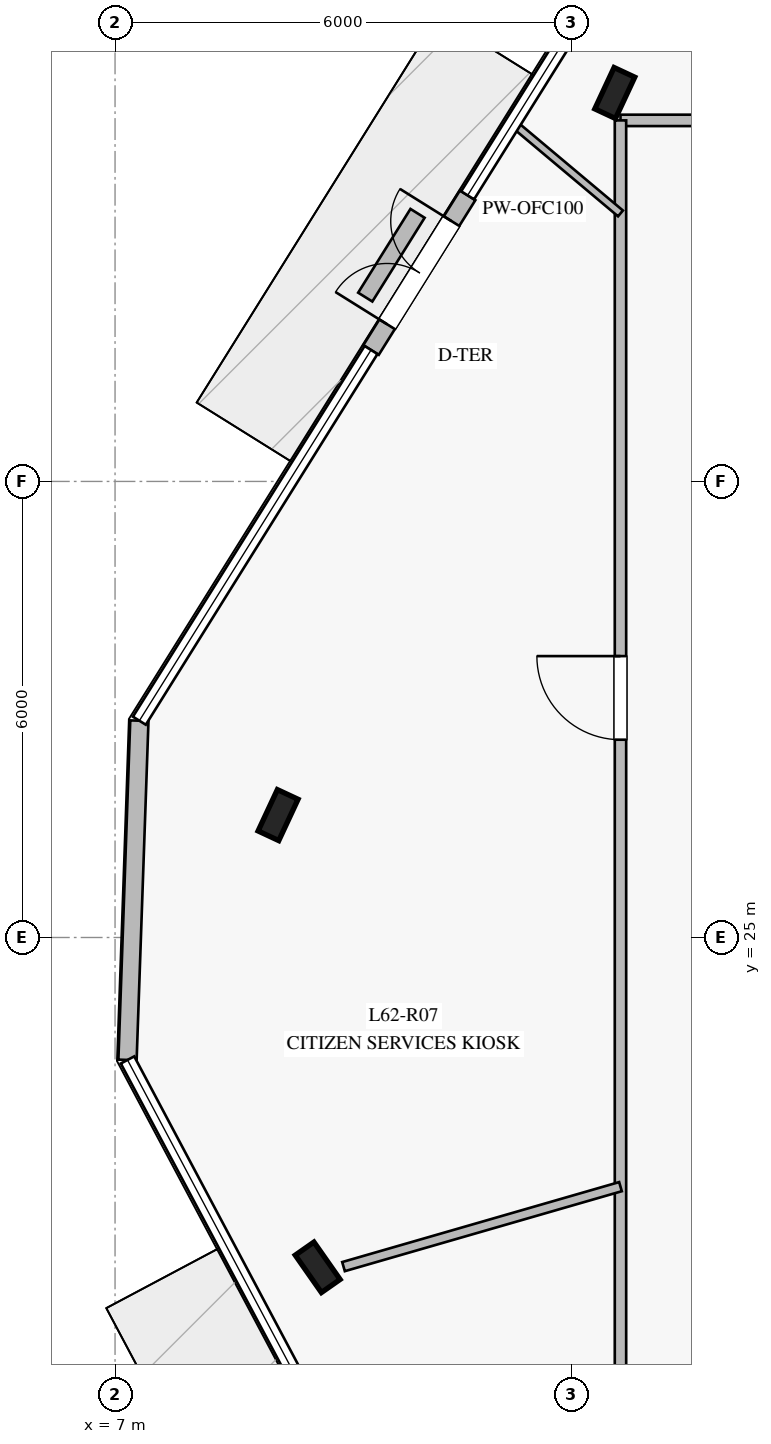
"""IFC4 building model, lengths in metres.
Left out: names, types, materials, properties, quantities, classifications, styles, units other than length and angle.
Written with IfcOpenShell. Run it as: python <this file> out.ifc"""

import sys

from ifc_helpers import new_model, si_unit, direction, frame, frame_2d, origin, origin_2d, place, context, subcontext, project, spatial, rectangle, i_section, extrude, element, fill, save


model = new_model("IFC4")
c1 = context("Model", 3, precision=1e-05, world=origin(), true_north=direction((0.0, 1.0)))
c2 = subcontext(c1, "Body", "Model", "MODEL_VIEW")
j1 = project(units=[si_unit("LENGTHUNIT", "METRE"), si_unit("PLANEANGLEUNIT", "RADIAN")], contexts=[c1])
p1 = place(None, origin())
s1 = spatial("IfcSite", under=j1, at=p1, CompositionType="ELEMENT")
p2 = place(p1, origin())
s2 = spatial("IfcBuilding", under=s1, at=p2, CompositionType="ELEMENT")
p3 = place(p2, frame((0.0, 0.0, 258.2)))
s3 = spatial("IfcBuildingStorey", under=s2, at=p3, CompositionType="ELEMENT", Elevation=258.2)
for number, where, z_axis, x_axis in (
    (1, (13.575, 36.11, 0.0), (0.0, 0.0, 1.0), (0.423, 0.906, 0.0)),
    (2, (9.145, 26.61, 0.0), (0.0, 0.0, 1.0), (0.423, 0.906, 0.0)),
    (3, (9.666, 20.661, 0.0), (0.0, 0.0, 1.0), (-0.574, 0.819, 0.0)),
):
    element("IfcColumn", number, at=place(p3, frame(where, z_axis=z_axis, x_axis=x_axis)), inside=s3, PredefinedType="COLUMN", context=c2, shape_type="SweptSolid", body=[
        extrude(i_section(OverallWidth=0.3, OverallDepth=0.6, WebThickness=0.015, FlangeThickness=0.03, at=origin_2d()), origin(), (0.0, 0.0, 1.0), 4.0),
    ])
p4 = place(p3, frame((11.639, 34.764, 0.0), z_axis=(0.0, 0.0, 1.0), x_axis=(-0.529751954381, -0.84815262001, 0.0)))
e4 = element("IfcWall", 4, at=p4, inside=s3, PredefinedType="STANDARD", context=c2, shape_type="SweptSolid", body=[
    extrude(rectangle(XDim=2.399, YDim=0.24, at=frame_2d((1.2, 0.0))), origin(), (0.0, 0.0, 1.0), 3.78),
])
p5 = place(p4, frame((0.4, 0.0, 0.0)))
e5 = element("IfcOpeningElement", 5, at=p5, cuts=e4, PredefinedType="OPENING", context=c2, shape_type="SweptSolid", body=[
    extrude(rectangle(XDim=1.6, YDim=2.25, at=frame_2d((0.8, 1.125))), frame((0.0, 0.13, 0.0), z_axis=(0.0, -1.0, 0.0), x_axis=(1.0, 0.0, 0.0)), (0.0, 0.0, 1.0), 0.26),
])
p6 = place(p3, frame((7.32, 27.852, 0.0), z_axis=(0.0, 0.0, 1.0), x_axis=(-0.034932990029, -0.999389656844, 0.0)))
e6 = element("IfcWall", 6, at=p6, inside=s3, PredefinedType="STANDARD", context=c2, shape_type="SweptSolid", body=[
    extrude(rectangle(XDim=4.466, YDim=0.24, at=frame_2d((2.233, 0.0))), origin(), (0.0, 0.0, 1.0), 3.78),
])
p7 = place(p3, frame((10.98, 34.527, 0.0), z_axis=(0.0, 0.0, 1.0), x_axis=(-0.52955968417, -0.848272680747, 0.0)))
e7 = element("IfcWall", 7, at=p7, inside=s3, PredefinedType="USERDEFINED", context=c2, shape_type="SweptSolid", body=[
    extrude(rectangle(XDim=1.299, YDim=0.22, at=frame_2d((0.649, 0.0))), origin(), (0.0, 0.0, 1.0), 0.4),
])
p8 = place(p3, frame((13.65, 35.75, 0.0), z_axis=(0.0, 0.0, 1.0), x_axis=(1.0, 0.0, 0.0)))
e8 = element("IfcWall", 8, at=p8, inside=s3, PredefinedType="PARTITIONING", context=c2, shape_type="SweptSolid", body=[
    extrude(rectangle(XDim=22.7, YDim=0.15, at=frame_2d((11.35, 0.0))), origin(), (0.0, 0.0, 1.0), 3.28),
])
p9 = place(p8, frame((20.95, 0.0, 0.0)))
e9 = element("IfcOpeningElement", 9, at=p9, cuts=e8, PredefinedType="OPENING", context=c2, shape_type="SweptSolid", body=[
    extrude(rectangle(XDim=1.1, YDim=2.2, at=frame_2d((0.55, 1.1))), frame((0.0, 0.085, 0.0), z_axis=(0.0, -1.0, 0.0), x_axis=(1.0, 0.0, 0.0)), (0.0, 0.0, 1.0), 0.17),
])
p10 = place(p8, frame((14.644, 0.0, 0.0)))
e10 = element("IfcOpeningElement", 10, at=p10, cuts=e8, PredefinedType="OPENING", context=c2, shape_type="SweptSolid", body=[
    extrude(rectangle(XDim=1.1, YDim=2.2, at=frame_2d((0.55, 1.1))), frame((0.0, 0.085, 0.0), z_axis=(0.0, -1.0, 0.0), x_axis=(1.0, 0.0, 0.0)), (0.0, 0.0, 1.0), 0.17),
])
p11 = place(p8, frame((4.649, 0.0, 0.0)))
e11 = element("IfcOpeningElement", 11, at=p11, cuts=e8, PredefinedType="OPENING", context=c2, shape_type="SweptSolid", body=[
    extrude(rectangle(XDim=1.1, YDim=2.2, at=frame_2d((0.55, 1.1))), frame((0.0, 0.085, 0.0), z_axis=(0.0, -1.0, 0.0), x_axis=(1.0, 0.0, 0.0)), (0.0, 0.0, 1.0), 0.17),
])
p12 = place(p3, frame((13.65, 14.25, 0.0), z_axis=(0.0, 0.0, 1.0), x_axis=(0.0, 1.0, 0.0)))
e12 = element("IfcWall", 12, at=p12, inside=s3, PredefinedType="PARTITIONING", context=c2, shape_type="SweptSolid", body=[
    extrude(rectangle(XDim=21.5, YDim=0.15, at=frame_2d((10.75, 0.0))), origin(), (0.0, 0.0, 1.0), 3.25),
])
p13 = place(p12, frame((13.352, 0.0, 0.0)))
e13 = element("IfcOpeningElement", 13, at=p13, cuts=e12, PredefinedType="OPENING", context=c2, shape_type="SweptSolid", body=[
    extrude(rectangle(XDim=1.1, YDim=2.2, at=frame_2d((0.55, 1.1))), frame((0.0, 0.085, 0.0), z_axis=(0.0, -1.0, 0.0), x_axis=(1.0, 0.0, 0.0)), (0.0, 0.0, 1.0), 0.17),
])
p14 = place(p3, frame((13.65, 34.526, 0.0), z_axis=(0.0, 0.0, 1.0), x_axis=(-0.76596722559, 0.64287962273, 0.0)))
e14 = element("IfcWall", 14, at=p14, inside=s3, PredefinedType="MOVABLE", context=c2, shape_type="SweptSolid", body=[
    extrude(rectangle(XDim=1.833, YDim=0.1, at=frame_2d((0.917, 0.0))), origin(), (0.0, 0.0, 1.0), 3.28),
])
p15 = place(p3, frame((13.65, 21.722, 0.0), z_axis=(0.0, 0.0, 1.0), x_axis=(-0.960759940579, -0.277381211655, 0.0)))
e15 = element("IfcWall", 15, at=p15, inside=s3, PredefinedType="PARTITIONING", context=c2, shape_type="SweptSolid", body=[
    extrude(rectangle(XDim=3.793, YDim=0.125, at=frame_2d((1.896, 0.0))), origin(), (0.0, 0.0, 1.0), 3.28),
])
p16 = place(p5, frame((1.6, 0.0, 0.0), z_axis=(0.0, 0.0, 1.0), x_axis=(-1.0, 0.0, 0.0)))
e16 = element("IfcDoor", 16, at=p16, inside=s3, OperationType="DOUBLE_DOOR_SINGLE_SWING", PredefinedType="DOOR", context=c2, shape_type="SweptSolid", body=[
    extrude(rectangle(XDim=1.6, YDim=2.25, at=frame_2d((0.8, 1.125))), frame((0.0, 0.025, 0.0), z_axis=(0.0, -1.0, 0.0), x_axis=(1.0, 0.0, 0.0)), (0.0, 0.0, 1.0), 0.05),
])
fill(e5, e16)
p17 = place(p13, origin())
e17 = element("IfcDoor", 17, at=p17, inside=s3, OperationType="SINGLE_SWING_RIGHT", PredefinedType="DOOR", context=c2, shape_type="SweptSolid", body=[
    extrude(rectangle(XDim=1.1, YDim=2.2, at=frame_2d((0.55, 1.1))), frame((0.0, 0.025, 0.0), z_axis=(0.0, -1.0, 0.0), x_axis=(1.0, 0.0, 0.0)), (0.0, 0.0, 1.0), 0.05),
])
fill(e13, e17)
save(model, sys.argv[1])
